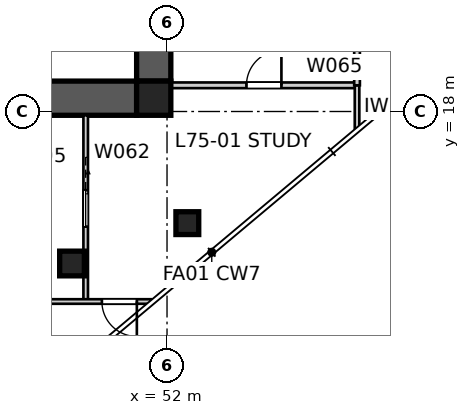
"""IFC4 building model, lengths in metres.
Left out: names, types, materials, properties, quantities, classifications, styles, units other than length and angle.
Written with IfcOpenShell. Run it as: python <this file> out.ifc"""

import sys

from ifc_helpers import new_model, si_unit, direction, frame, frame_2d, origin, origin_2d, place, context, subcontext, project, spatial, polyline, rectangle, outline, extrude, element, fill, save


model = new_model("IFC4")
c1 = context("Model", 3, precision=1e-05, world=origin(), true_north=direction((0.0, 1.0)))
c2 = subcontext(c1, "Body", "Model", "MODEL_VIEW")
j1 = project(units=[si_unit("LENGTHUNIT", "METRE"), si_unit("PLANEANGLEUNIT", "RADIAN")], contexts=[c1])
p1 = place(None, origin())
s1 = spatial("IfcSite", under=j1, at=p1, CompositionType="ELEMENT")
p2 = place(p1, origin())
s2 = spatial("IfcBuilding", under=s1, at=p2, CompositionType="ELEMENT")
p3 = place(p2, frame((0.0, 0.0, 272.6)))
s3 = spatial("IfcBuildingStorey", under=s2, at=p3, CompositionType="ELEMENT", Elevation=272.6)
p4 = place(p3, frame((51.2, 18.35, 0.0), z_axis=(0.0, 0.0, 1.0), x_axis=(-1.0, 0.0, 0.0)))
e1 = element("IfcWall", 1, at=p4, inside=s3, PredefinedType="SHEAR", context=c2, shape_type="SweptSolid", body=[
    extrude(outline(polyline([(0.0, -0.45), (22.4, -0.45), (22.4, -0.025), (22.85, -0.025), (22.85, 0.025), (22.4, 0.025), (22.4, 0.45), (0.0, 0.45), (0.0, 0.025), (-0.45, 0.025), (-0.45, -0.025), (0.0, -0.025), (0.0, -0.45)])), origin(), (0.0, 0.0, 1.0), 3.4),
])
p5 = place(p3, frame((51.65, 18.8, 0.0), z_axis=(0.0, 0.0, 1.0), x_axis=(0.0, 1.0, 0.0)))
e2 = element("IfcWall", 2, at=p5, inside=s3, PredefinedType="SHEAR", context=c2, shape_type="SweptSolid", body=[
    extrude(outline(polyline([(0.0, -0.45), (22.4, -0.45), (22.4, -0.025), (22.85, -0.025), (22.85, 0.025), (22.4, 0.025), (22.4, 0.45), (0.0, 0.45), (0.0, 0.025), (-0.45, 0.025), (-0.45, -0.025), (0.0, -0.025), (0.0, -0.45)])), origin(), (0.0, 0.0, 1.0), 3.4),
])
p6 = place(p5, frame((11.14, 0.0, 0.0)))
e3 = element("IfcOpeningElement", 3, at=p6, cuts=e2, PredefinedType="OPENING", context=c2, shape_type="SweptSolid", body=[
    extrude(rectangle(XDim=1.02, YDim=2.4, at=frame_2d((0.51, 1.2))), frame((0.0, 0.46, 0.0), z_axis=(0.0, -1.0, 0.0), x_axis=(1.0, 0.0, 0.0)), (0.0, 0.0, 1.0), 0.92),
])
p7 = place(p3, frame((51.65, 18.35, 0.0), z_axis=(0.0, 0.0, 1.0), x_axis=(1.0, 0.0, 0.0)))
e4 = element("IfcColumn", 4, at=p7, inside=s3, PredefinedType="COLUMN", context=c2, shape_type="SweptSolid", body=[
    extrude(rectangle(XDim=0.9, YDim=0.9, at=origin_2d()), origin(), (0.0, 0.0, 1.0), 3.4),
])
p8 = place(p3, frame((52.534, 15.062, -0.15), z_axis=(0.0, 0.0, 1.0), x_axis=(1.0, 0.0, 0.0)))
e5 = element("IfcColumn", 5, at=p8, inside=s3, PredefinedType="COLUMN", context=c2, shape_type="SweptSolid", body=[
    extrude(rectangle(XDim=0.6, YDim=0.6, at=origin_2d()), origin(), (0.0, 0.0, 1.0), 3.55),
])
p9 = place(p3, frame((49.5, 14.0, 0.0), z_axis=(0.0, 0.0, 1.0), x_axis=(1.0, 0.0, 0.0)))
e6 = element("IfcColumn", 6, at=p9, inside=s3, PredefinedType="COLUMN", context=c2, shape_type="SweptSolid", body=[
    extrude(rectangle(XDim=0.65, YDim=0.65, at=origin_2d()), origin(), (0.0, 0.0, 1.0), 3.4),
])
p10 = place(p3, frame((49.86, 17.9, 0.0), z_axis=(0.0, 0.0, 1.0), x_axis=(0.0, -1.0, 0.0)))
e7 = element("IfcWall", 7, at=p10, inside=s3, PredefinedType="PARTITIONING", context=c2, shape_type="SweptSolid", body=[
    extrude(rectangle(XDim=4.9, YDim=0.12, at=frame_2d((2.45, 0.0))), origin(), (0.0, 0.0, 1.0), 3.25),
])
p11 = place(p10, frame((1.97, 0.0, 0.0)))
e8 = element("IfcOpeningElement", 8, at=p11, cuts=e7, PredefinedType="OPENING", context=c2, shape_type="SweptSolid", body=[
    extrude(rectangle(XDim=0.96, YDim=2.1, at=frame_2d((0.48, 1.05))), frame((0.0, 0.07, 0.0), z_axis=(0.0, -1.0, 0.0), x_axis=(1.0, 0.0, 0.0)), (0.0, 0.0, 1.0), 0.14),
])
p12 = place(p3, frame((51.57, 13.0, 0.0), z_axis=(0.0, 0.0, 1.0), x_axis=(-1.0, 0.0, 0.0)))
e9 = element("IfcWall", 9, at=p12, inside=s3, PredefinedType="PARTITIONING", context=c2, shape_type="SweptSolid", body=[
    extrude(rectangle(XDim=6.652, YDim=0.12, at=frame_2d((3.326, 0.0))), origin(), (0.0, 0.0, 1.0), 2.55),
])
p13 = place(p12, frame((0.364, 0.0, 0.0)))
e10 = element("IfcOpeningElement", 10, at=p13, cuts=e9, PredefinedType="OPENING", context=c2, shape_type="SweptSolid", body=[
    extrude(rectangle(XDim=0.92, YDim=2.1, at=frame_2d((0.46, 1.05))), frame((0.0, 0.07, 0.0), z_axis=(0.0, -1.0, 0.0), x_axis=(1.0, 0.0, 0.0)), (0.0, 0.0, 1.0), 0.14),
])
p14 = place(p3, frame((51.18, 18.689, 0.0), z_axis=(0.0, 0.0, 1.0), x_axis=(1.0, 0.0, 0.0)))
e11 = element("IfcWall", 11, at=p14, inside=s3, PredefinedType="SOLIDWALL", context=c2, shape_type="SweptSolid", body=[
    extrude(rectangle(XDim=5.82, YDim=0.15, at=frame_2d((2.91, 0.0))), origin(), (0.0, 0.0, 1.0), 3.25),
])
p15 = place(p14, frame((2.91, 0.0, 0.0)))
e12 = element("IfcOpeningElement", 12, at=p15, cuts=e11, PredefinedType="OPENING", context=c2, shape_type="SweptSolid", body=[
    extrude(rectangle(XDim=0.92, YDim=2.1, at=frame_2d((0.46, 1.05))), frame((0.0, 0.085, 0.0), z_axis=(0.0, -1.0, 0.0), x_axis=(1.0, 0.0, 0.0)), (0.0, 0.0, 1.0), 0.17),
])
p16 = place(p3, frame((57.0, 18.689, 0.0), z_axis=(0.0, 0.0, 1.0), x_axis=(0.0, -1.0, 0.0)))
e13 = element("IfcWall", 13, at=p16, inside=s3, PredefinedType="PARTITIONING", context=c2, shape_type="SweptSolid", body=[
    extrude(rectangle(XDim=1.133, YDim=0.12, at=frame_2d((0.567, 0.0))), origin(), (0.0, 0.0, 1.0), 3.25),
])
p17 = place(p3, frame((57.0, 23.81, 0.0), z_axis=(0.0, 0.0, 1.0), x_axis=(0.0, -1.0, 0.0)))
e14 = element("IfcWall", 14, at=p17, inside=s3, PredefinedType="SOLIDWALL", context=c2, shape_type="SweptSolid", body=[
    extrude(rectangle(XDim=5.121, YDim=0.15, at=frame_2d((2.56, 0.0))), origin(), (0.0, 0.0, 1.0), 3.25),
])
p18 = place(p15, origin())
e15 = element("IfcDoor", 15, at=p18, inside=s3, OperationType="SINGLE_SWING_RIGHT", PredefinedType="DOOR", context=c2, shape_type="SweptSolid", body=[
    extrude(rectangle(XDim=0.92, YDim=2.1, at=frame_2d((0.46, 1.05))), frame((0.0, 0.025, 0.0), z_axis=(0.0, -1.0, 0.0), x_axis=(1.0, 0.0, 0.0)), (0.0, 0.0, 1.0), 0.05),
])
fill(e12, e15)
p19 = place(p11, origin())
e16 = element("IfcDoor", 16, at=p19, inside=s3, OperationType="SLIDING_TO_LEFT", PredefinedType="DOOR", context=c2, shape_type="SweptSolid", body=[
    extrude(rectangle(XDim=0.96, YDim=2.1, at=frame_2d((0.48, 1.05))), frame((0.0, 0.025, 0.0), z_axis=(0.0, -1.0, 0.0), x_axis=(1.0, 0.0, 0.0)), (0.0, 0.0, 1.0), 0.05),
])
fill(e8, e16)
p20 = place(p13, origin())
e17 = element("IfcDoor", 17, at=p20, inside=s3, OperationType="SINGLE_SWING_LEFT", PredefinedType="DOOR", context=c2, shape_type="SweptSolid", body=[
    extrude(rectangle(XDim=0.92, YDim=2.1, at=frame_2d((0.46, 1.05))), frame((0.0, 0.025, 0.0), z_axis=(0.0, -1.0, 0.0), x_axis=(1.0, 0.0, 0.0)), (0.0, 0.0, 1.0), 0.05),
])
fill(e10, e17)
save(model, sys.argv[1])
